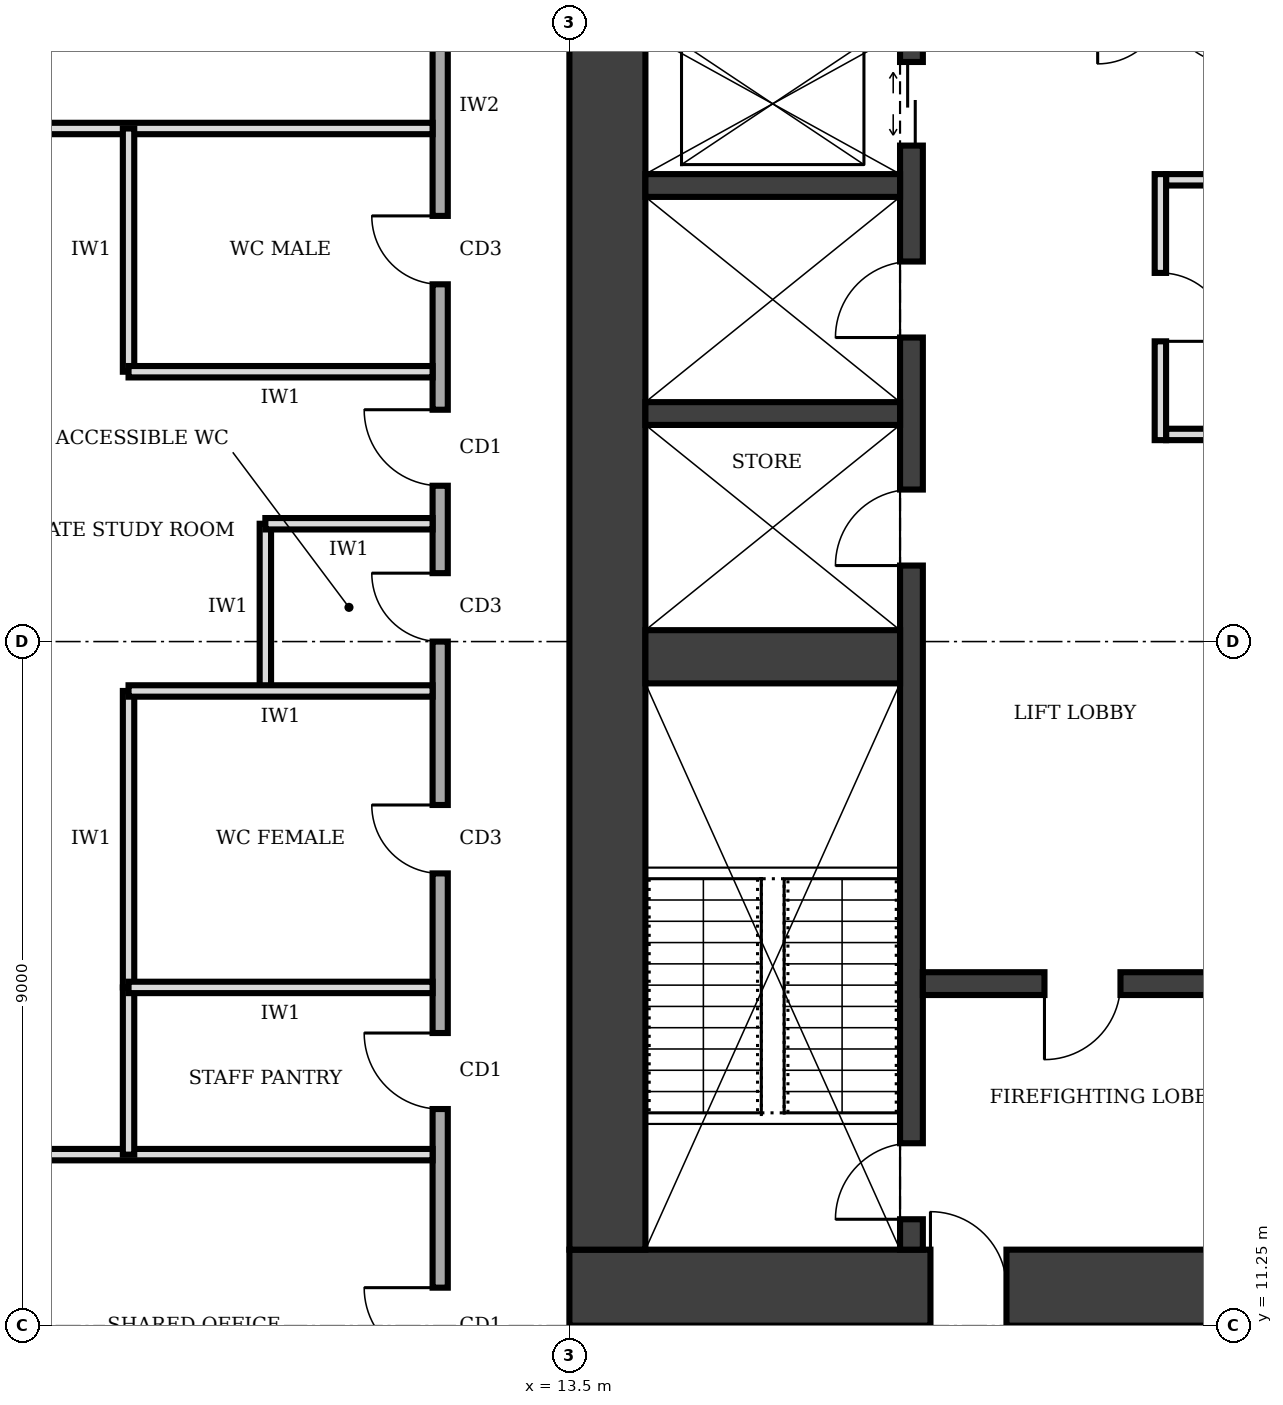
"""IFC4 building model, lengths in metres.
Left out: names, types, materials, properties, quantities, classifications, styles, units other than length and angle.
Written with IfcOpenShell. Run it as: python <this file> out.ifc"""

import sys

from ifc_helpers import new_model, si_unit, direction, frame, frame_2d, origin, place, context, subcontext, project, spatial, rectangle, extrude, element, fill, save


model = new_model("IFC4")
c1 = context("Model", 3, precision=1e-05, world=origin(), true_north=direction((0.0, 1.0)))
c2 = subcontext(c1, "Body", "Model", "MODEL_VIEW")
j1 = project(units=[si_unit("LENGTHUNIT", "METRE"), si_unit("PLANEANGLEUNIT", "RADIAN")], contexts=[c1])
p1 = place(None, origin())
s1 = spatial("IfcSite", under=j1, at=p1, CompositionType="ELEMENT")
p2 = place(p1, origin())
s2 = spatial("IfcBuilding", under=s1, at=p2, CompositionType="ELEMENT")
p3 = place(p2, frame((0.0, 0.0, 261.0)))
s3 = spatial("IfcBuildingStorey", under=s2, at=p3, CompositionType="ELEMENT", Elevation=261.0)
p4 = place(p3, frame((13.5, 11.75, 0.0), z_axis=(0.0, 0.0, 1.0), x_axis=(1.0, 0.0, 0.0)))
e1 = element("IfcWall", 1, at=p4, inside=s3, PredefinedType="SHEAR", context=c2, shape_type="SweptSolid", body=[
    extrude(rectangle(XDim=13.5, YDim=1.0, at=frame_2d((6.75, 0.0))), origin(), (0.0, 0.0, 1.0), 4.0),
])
p5 = place(p4, frame((4.75, 0.0, 0.0)))
e2 = element("IfcOpeningElement", 2, at=p5, cuts=e1, PredefinedType="OPENING", context=c2, shape_type="SweptSolid", body=[
    extrude(rectangle(XDim=1.0, YDim=2.1, at=frame_2d((0.5, 1.05))), frame((0.0, 0.51, 0.0), z_axis=(0.0, -1.0, 0.0), x_axis=(1.0, 0.0, 0.0)), (0.0, 0.0, 1.0), 1.02),
])
p6 = place(p3, frame((14.0, 28.25, 0.0), z_axis=(0.0, 0.0, 1.0), x_axis=(0.0, -1.0, 0.0)))
e3 = element("IfcWall", 3, at=p6, inside=s3, PredefinedType="SHEAR", context=c2, shape_type="SweptSolid", body=[
    extrude(rectangle(XDim=16.0, YDim=1.0, at=frame_2d((8.0, 0.0))), origin(), (0.0, 0.0, 1.0), 4.0),
])
p7 = place(p3, frame((18.0, 12.25, 0.0), z_axis=(0.0, 0.0, 1.0), x_axis=(0.0, 1.0, 0.0)))
e4 = element("IfcWall", 4, at=p7, inside=s3, PredefinedType="SHEAR", context=c2, shape_type="SweptSolid", body=[
    extrude(rectangle(XDim=16.0, YDim=0.3, at=frame_2d((8.0, 0.0))), origin(), (0.0, 0.0, 1.0), 4.0),
])
p8 = place(p7, frame((0.4, 0.0, 0.0)))
e5 = element("IfcOpeningElement", 5, at=p8, cuts=e4, PredefinedType="OPENING", context=c2, shape_type="SweptSolid", body=[
    extrude(rectangle(XDim=1.0, YDim=2.1, at=frame_2d((0.5, 1.05))), frame((0.0, 0.16, 0.0), z_axis=(0.0, -1.0, 0.0), x_axis=(1.0, 0.0, 0.0)), (0.0, 0.0, 1.0), 0.32),
])
p9 = place(p7, frame((14.525, 0.0, 0.0)))
e6 = element("IfcOpeningElement", 6, at=p9, cuts=e4, PredefinedType="OPENING", context=c2, shape_type="SweptSolid", body=[
    extrude(rectangle(XDim=1.1, YDim=2.1, at=frame_2d((0.55, 1.05))), frame((0.0, 0.16, 0.0), z_axis=(0.0, -1.0, 0.0), x_axis=(1.0, 0.0, 0.0)), (0.0, 0.0, 1.0), 0.32),
])
p10 = place(p7, frame((9.0, 0.0, 0.0)))
e7 = element("IfcOpeningElement", 7, at=p10, cuts=e4, PredefinedType="OPENING", context=c2, shape_type="SweptSolid", body=[
    extrude(rectangle(XDim=1.0, YDim=2.1, at=frame_2d((0.5, 1.05))), frame((0.0, 0.16, 0.0), z_axis=(0.0, -1.0, 0.0), x_axis=(1.0, 0.0, 0.0)), (0.0, 0.0, 1.0), 0.32),
])
p11 = place(p7, frame((12.0, 0.0, 0.0)))
e8 = element("IfcOpeningElement", 8, at=p11, cuts=e4, PredefinedType="OPENING", context=c2, shape_type="SweptSolid", body=[
    extrude(rectangle(XDim=1.0, YDim=2.1, at=frame_2d((0.5, 1.05))), frame((0.0, 0.16, 0.0), z_axis=(0.0, -1.0, 0.0), x_axis=(1.0, 0.0, 0.0)), (0.0, 0.0, 1.0), 0.32),
])
p12 = place(p3, frame((14.5, 20.05, 0.0), z_axis=(0.0, 0.0, 1.0), x_axis=(1.0, 0.0, 0.0)))
e9 = element("IfcWall", 9, at=p12, inside=s3, PredefinedType="SHEAR", context=c2, shape_type="SweptSolid", body=[
    extrude(rectangle(XDim=3.35, YDim=0.7, at=frame_2d((1.675, 0.0))), origin(), (0.0, 0.0, 1.0), 4.0),
])
p13 = place(p3, frame((18.15, 15.75, 0.0), z_axis=(0.0, 0.0, 1.0), x_axis=(1.0, 0.0, 0.0)))
e10 = element("IfcWall", 10, at=p13, inside=s3, PredefinedType="SHEAR", context=c2, shape_type="SweptSolid", body=[
    extrude(rectangle(XDim=4.2, YDim=0.3, at=frame_2d((2.1, 0.0))), origin(), (0.0, 0.0, 1.0), 4.0),
])
p14 = place(p13, frame((1.6, 0.0, 0.0)))
e11 = element("IfcOpeningElement", 11, at=p14, cuts=e10, PredefinedType="OPENING", context=c2, shape_type="SweptSolid", body=[
    extrude(rectangle(XDim=1.0, YDim=2.1, at=frame_2d((0.5, 1.05))), frame((0.0, 0.16, 0.0), z_axis=(0.0, -1.0, 0.0), x_axis=(1.0, 0.0, 0.0)), (0.0, 0.0, 1.0), 0.32),
])
for number, where, z_axis, x_axis in (
    (12, (14.5, 23.25, 0.0), (0.0, 0.0, 1.0), (1.0, 0.0, 0.0)),
    (13, (14.5, 26.25, 0.0), (0.0, 0.0, 1.0), (1.0, 0.0, 0.0)),
):
    element("IfcWall", number, at=place(p3, frame(where, z_axis=z_axis, x_axis=x_axis)), inside=s3, PredefinedType="SHEAR", context=c2, shape_type="SweptSolid", body=[
        extrude(rectangle(XDim=3.35, YDim=0.3, at=frame_2d((1.675, 0.0))), origin(), (0.0, 0.0, 1.0), 4.0),
    ])
p15 = place(p3, frame((21.275, 22.9, 0.0), z_axis=(0.0, 0.0, 1.0), x_axis=(0.0, 1.0, 0.0)))
e14 = element("IfcWall", 14, at=p15, inside=s3, PredefinedType="PARTITIONING", context=c2, shape_type="SweptSolid", body=[
    extrude(rectangle(XDim=3.5, YDim=0.15, at=frame_2d((1.75, 0.0))), origin(), (0.0, 0.0, 1.0), 3.75),
])
p16 = place(p15, frame((1.3, 0.0, 0.0)))
e15 = element("IfcOpeningElement", 15, at=p16, cuts=e14, PredefinedType="OPENING", context=c2, shape_type="SweptSolid", body=[
    extrude(rectangle(XDim=0.9, YDim=2.1, at=frame_2d((0.45, 1.05))), frame((0.0, 0.085, 0.0), z_axis=(0.0, -1.0, 0.0), x_axis=(1.0, 0.0, 0.0)), (0.0, 0.0, 1.0), 0.17),
])
for number, where, z_axis, x_axis in (
    (16, (21.35, 22.975, 0.0), (0.0, 0.0, 1.0), (1.0, 0.0, 0.0)),
    (17, (21.35, 26.325, 0.0), (0.0, 0.0, 1.0), (1.0, 0.0, 0.0)),
):
    element("IfcWall", number, at=place(p3, frame(where, z_axis=z_axis, x_axis=x_axis)), inside=s3, PredefinedType="PARTITIONING", context=c2, shape_type="SweptSolid", body=[
        extrude(rectangle(XDim=1.0, YDim=0.15, at=frame_2d((0.5, 0.0))), origin(), (0.0, 0.0, 1.0), 3.75),
    ])
p17 = place(p3, frame((11.8, 31.3, 0.0), z_axis=(0.0, 0.0, 1.0), x_axis=(0.0, -1.0, 0.0)))
e18 = element("IfcWall", 18, at=p17, inside=s3, PredefinedType="SOLIDWALL", context=c2, shape_type="SweptSolid", body=[
    extrude(rectangle(XDim=22.3, YDim=0.2, at=frame_2d((11.15, 0.0))), origin(), (0.0, 0.0, 1.0), 3.75),
])
p18 = place(p17, frame((19.55, 0.0, 0.0)))
e19 = element("IfcOpeningElement", 19, at=p18, cuts=e18, PredefinedType="OPENING", context=c2, shape_type="SweptSolid", body=[
    extrude(rectangle(XDim=1.0, YDim=2.1, at=frame_2d((0.5, 1.05))), frame((0.0, 0.11, 0.0), z_axis=(0.0, -1.0, 0.0), x_axis=(1.0, 0.0, 0.0)), (0.0, 0.0, 1.0), 0.22),
])
p19 = place(p17, frame((16.2, 0.0, 0.0)))
e20 = element("IfcOpeningElement", 20, at=p19, cuts=e18, PredefinedType="OPENING", context=c2, shape_type="SweptSolid", body=[
    extrude(rectangle(XDim=1.0, YDim=2.1, at=frame_2d((0.5, 1.05))), frame((0.0, 0.11, 0.0), z_axis=(0.0, -1.0, 0.0), x_axis=(1.0, 0.0, 0.0)), (0.0, 0.0, 1.0), 0.22),
])
p20 = place(p17, frame((13.2, 0.0, 0.0)))
e21 = element("IfcOpeningElement", 21, at=p20, cuts=e18, PredefinedType="OPENING", context=c2, shape_type="SweptSolid", body=[
    extrude(rectangle(XDim=0.9, YDim=2.1, at=frame_2d((0.45, 1.05))), frame((0.0, 0.11, 0.0), z_axis=(0.0, -1.0, 0.0), x_axis=(1.0, 0.0, 0.0)), (0.0, 0.0, 1.0), 0.22),
])
p21 = place(p17, frame((10.15, 0.0, 0.0)))
e22 = element("IfcOpeningElement", 22, at=p21, cuts=e18, PredefinedType="OPENING", context=c2, shape_type="SweptSolid", body=[
    extrude(rectangle(XDim=0.9, YDim=2.1, at=frame_2d((0.45, 1.05))), frame((0.0, 0.11, 0.0), z_axis=(0.0, -1.0, 0.0), x_axis=(1.0, 0.0, 0.0)), (0.0, 0.0, 1.0), 0.22),
])
p22 = place(p17, frame((5.45, 0.0, 0.0)))
e23 = element("IfcOpeningElement", 23, at=p22, cuts=e18, PredefinedType="OPENING", context=c2, shape_type="SweptSolid", body=[
    extrude(rectangle(XDim=0.9, YDim=2.1, at=frame_2d((0.45, 1.05))), frame((0.0, 0.11, 0.0), z_axis=(0.0, -1.0, 0.0), x_axis=(1.0, 0.0, 0.0)), (0.0, 0.0, 1.0), 0.22),
])
p23 = place(p17, frame((8.0, 0.0, 0.0)))
e24 = element("IfcOpeningElement", 24, at=p23, cuts=e18, PredefinedType="OPENING", context=c2, shape_type="SweptSolid", body=[
    extrude(rectangle(XDim=1.0, YDim=2.1, at=frame_2d((0.5, 1.05))), frame((0.0, 0.11, 0.0), z_axis=(0.0, -1.0, 0.0), x_axis=(1.0, 0.0, 0.0)), (0.0, 0.0, 1.0), 0.22),
])
p24 = place(p17, frame((1.55, 0.0, 0.0)))
e25 = element("IfcOpeningElement", 25, at=p24, cuts=e18, PredefinedType="OPENING", context=c2, shape_type="SweptSolid", body=[
    extrude(rectangle(XDim=1.0, YDim=2.1, at=frame_2d((0.5, 1.05))), frame((0.0, 0.11, 0.0), z_axis=(0.0, -1.0, 0.0), x_axis=(1.0, 0.0, 0.0)), (0.0, 0.0, 1.0), 0.22),
])
for number, where, z_axis, x_axis in (
    (26, (0.3, 13.5, 0.0), (0.0, 0.0, 1.0), (1.0, 0.0, 0.0)),
    (27, (0.3, 27.0, 0.0), (0.0, 0.0, 1.0), (1.0, 0.0, 0.0)),
):
    element("IfcWall", number, at=place(p3, frame(where, z_axis=z_axis, x_axis=x_axis)), inside=s3, PredefinedType="PARTITIONING", context=c2, shape_type="SweptSolid", body=[
        extrude(rectangle(XDim=11.4, YDim=0.15, at=frame_2d((5.7, 0.0))), origin(), (0.0, 0.0, 1.0), 3.75),
    ])
p25 = place(p3, frame((11.7, 15.7, 0.0), z_axis=(0.0, 0.0, 1.0), x_axis=(-1.0, 0.0, 0.0)))
e28 = element("IfcWall", 28, at=p25, inside=s3, PredefinedType="PARTITIONING", context=c2, shape_type="SweptSolid", body=[
    extrude(rectangle(XDim=4.0, YDim=0.15, at=frame_2d((2.0, 0.0))), origin(), (0.0, 0.0, 1.0), 3.75),
])
p26 = place(p3, frame((11.7, 19.6, 0.0), z_axis=(0.0, 0.0, 1.0), x_axis=(-1.0, 0.0, 0.0)))
e29 = element("IfcWall", 29, at=p26, inside=s3, PredefinedType="PARTITIONING", context=c2, shape_type="SweptSolid", body=[
    extrude(rectangle(XDim=4.0, YDim=0.15, at=frame_2d((2.0, 0.0))), origin(), (0.0, 0.0, 1.0), 2.85),
])
p27 = place(p3, frame((11.7, 21.8, 0.0), z_axis=(0.0, 0.0, 1.0), x_axis=(-1.0, 0.0, 0.0)))
e30 = element("IfcWall", 30, at=p27, inside=s3, PredefinedType="PARTITIONING", context=c2, shape_type="SweptSolid", body=[
    extrude(rectangle(XDim=2.2, YDim=0.15, at=frame_2d((1.1, 0.0))), origin(), (0.0, 0.0, 1.0), 3.75),
])
p28 = place(p3, frame((11.7, 23.8, 0.0), z_axis=(0.0, 0.0, 1.0), x_axis=(-1.0, 0.0, 0.0)))
e31 = element("IfcWall", 31, at=p28, inside=s3, PredefinedType="PARTITIONING", context=c2, shape_type="SweptSolid", body=[
    extrude(rectangle(XDim=4.0, YDim=0.15, at=frame_2d((2.0, 0.0))), origin(), (0.0, 0.0, 1.0), 3.75),
])
p29 = place(p3, frame((7.7, 13.5, 0.0), z_axis=(0.0, 0.0, 1.0), x_axis=(0.0, 1.0, 0.0)))
e32 = element("IfcWall", 32, at=p29, inside=s3, PredefinedType="PARTITIONING", context=c2, shape_type="SweptSolid", body=[
    extrude(rectangle(XDim=2.2, YDim=0.15, at=frame_2d((1.1, 0.0))), origin(), (0.0, 0.0, 1.0), 3.75),
])
p30 = place(p3, frame((7.7, 15.7, 0.0), z_axis=(0.0, 0.0, 1.0), x_axis=(0.0, 1.0, 0.0)))
e33 = element("IfcWall", 33, at=p30, inside=s3, PredefinedType="PARTITIONING", context=c2, shape_type="SweptSolid", body=[
    extrude(rectangle(XDim=3.9, YDim=0.15, at=frame_2d((1.95, 0.0))), origin(), (0.0, 0.0, 1.0), 3.75),
])
p31 = place(p3, frame((9.5, 19.6, 0.0), z_axis=(0.0, 0.0, 1.0), x_axis=(0.0, 1.0, 0.0)))
e34 = element("IfcWall", 34, at=p31, inside=s3, PredefinedType="PARTITIONING", context=c2, shape_type="SweptSolid", body=[
    extrude(rectangle(XDim=2.2, YDim=0.15, at=frame_2d((1.1, 0.0))), origin(), (0.0, 0.0, 1.0), 3.75),
])
p32 = place(p3, frame((7.7, 23.8, 0.0), z_axis=(0.0, 0.0, 1.0), x_axis=(0.0, 1.0, 0.0)))
e35 = element("IfcWall", 35, at=p32, inside=s3, PredefinedType="PARTITIONING", context=c2, shape_type="SweptSolid", body=[
    extrude(rectangle(XDim=3.2, YDim=0.15, at=frame_2d((1.6, 0.0))), origin(), (0.0, 0.0, 1.0), 3.75),
])
p33 = place(p5, origin())
e36 = element("IfcDoor", 36, at=p33, inside=s3, OperationType="SINGLE_SWING_LEFT", PredefinedType="DOOR", context=c2, shape_type="SweptSolid", body=[
    extrude(rectangle(XDim=1.0, YDim=2.1, at=frame_2d((0.5, 1.05))), frame((0.0, 0.025, 0.0), z_axis=(0.0, -1.0, 0.0), x_axis=(1.0, 0.0, 0.0)), (0.0, 0.0, 1.0), 0.05),
])
fill(e2, e36)
p34 = place(p14, frame((1.0, 0.0, 0.0), z_axis=(0.0, 0.0, 1.0), x_axis=(-1.0, 0.0, 0.0)))
e37 = element("IfcDoor", 37, at=p34, inside=s3, OperationType="SINGLE_SWING_RIGHT", PredefinedType="DOOR", context=c2, shape_type="SweptSolid", body=[
    extrude(rectangle(XDim=1.0, YDim=2.1, at=frame_2d((0.5, 1.05))), frame((0.0, 0.025, 0.0), z_axis=(0.0, -1.0, 0.0), x_axis=(1.0, 0.0, 0.0)), (0.0, 0.0, 1.0), 0.05),
])
fill(e11, e37)
p35 = place(p8, origin())
e38 = element("IfcDoor", 38, at=p35, inside=s3, OperationType="SINGLE_SWING_LEFT", PredefinedType="DOOR", context=c2, shape_type="SweptSolid", body=[
    extrude(rectangle(XDim=1.0, YDim=2.1, at=frame_2d((0.5, 1.05))), frame((0.0, 0.025, 0.0), z_axis=(0.0, -1.0, 0.0), x_axis=(1.0, 0.0, 0.0)), (0.0, 0.0, 1.0), 0.05),
])
fill(e5, e38)
p36 = place(p9, origin())
e39 = element("IfcDoor", 39, at=p36, inside=s3, OperationType="DOUBLE_DOOR_SLIDING", PredefinedType="DOOR", context=c2, shape_type="SweptSolid", body=[
    extrude(rectangle(XDim=1.1, YDim=2.1, at=frame_2d((0.55, 1.05))), frame((0.0, 0.025, 0.0), z_axis=(0.0, -1.0, 0.0), x_axis=(1.0, 0.0, 0.0)), (0.0, 0.0, 1.0), 0.05),
])
fill(e6, e39)
p37 = place(p16, frame((0.9, 0.0, 0.0), z_axis=(0.0, 0.0, 1.0), x_axis=(-1.0, 0.0, 0.0)))
e40 = element("IfcDoor", 40, at=p37, inside=s3, OperationType="SINGLE_SWING_RIGHT", PredefinedType="DOOR", context=c2, shape_type="SweptSolid", body=[
    extrude(rectangle(XDim=0.9, YDim=2.1, at=frame_2d((0.45, 1.05))), frame((0.0, 0.025, 0.0), z_axis=(0.0, -1.0, 0.0), x_axis=(1.0, 0.0, 0.0)), (0.0, 0.0, 1.0), 0.05),
])
fill(e15, e40)
p38 = place(p10, origin())
e41 = element("IfcDoor", 41, at=p38, inside=s3, OperationType="SINGLE_SWING_LEFT", PredefinedType="DOOR", context=c2, shape_type="SweptSolid", body=[
    extrude(rectangle(XDim=1.0, YDim=2.1, at=frame_2d((0.5, 1.05))), frame((0.0, 0.025, 0.0), z_axis=(0.0, -1.0, 0.0), x_axis=(1.0, 0.0, 0.0)), (0.0, 0.0, 1.0), 0.05),
])
fill(e7, e41)
p39 = place(p11, origin())
e42 = element("IfcDoor", 42, at=p39, inside=s3, OperationType="SINGLE_SWING_LEFT", PredefinedType="DOOR", context=c2, shape_type="SweptSolid", body=[
    extrude(rectangle(XDim=1.0, YDim=2.1, at=frame_2d((0.5, 1.05))), frame((0.0, 0.025, 0.0), z_axis=(0.0, -1.0, 0.0), x_axis=(1.0, 0.0, 0.0)), (0.0, 0.0, 1.0), 0.05),
])
fill(e8, e42)
p40 = place(p18, frame((1.0, 0.0, 0.0), z_axis=(0.0, 0.0, 1.0), x_axis=(-1.0, 0.0, 0.0)))
e43 = element("IfcDoor", 43, at=p40, inside=s3, OperationType="SINGLE_SWING_RIGHT", PredefinedType="DOOR", context=c2, shape_type="SweptSolid", body=[
    extrude(rectangle(XDim=1.0, YDim=2.1, at=frame_2d((0.5, 1.05))), frame((0.0, 0.025, 0.0), z_axis=(0.0, -1.0, 0.0), x_axis=(1.0, 0.0, 0.0)), (0.0, 0.0, 1.0), 0.05),
])
fill(e19, e43)
p41 = place(p19, frame((1.0, 0.0, 0.0), z_axis=(0.0, 0.0, 1.0), x_axis=(-1.0, 0.0, 0.0)))
e44 = element("IfcDoor", 44, at=p41, inside=s3, OperationType="SINGLE_SWING_RIGHT", PredefinedType="DOOR", context=c2, shape_type="SweptSolid", body=[
    extrude(rectangle(XDim=1.0, YDim=2.1, at=frame_2d((0.5, 1.05))), frame((0.0, 0.025, 0.0), z_axis=(0.0, -1.0, 0.0), x_axis=(1.0, 0.0, 0.0)), (0.0, 0.0, 1.0), 0.05),
])
fill(e20, e44)
p42 = place(p20, frame((0.9, 0.0, 0.0), z_axis=(0.0, 0.0, 1.0), x_axis=(-1.0, 0.0, 0.0)))
e45 = element("IfcDoor", 45, at=p42, inside=s3, OperationType="SINGLE_SWING_RIGHT", PredefinedType="DOOR", context=c2, shape_type="SweptSolid", body=[
    extrude(rectangle(XDim=0.9, YDim=2.1, at=frame_2d((0.45, 1.05))), frame((0.0, 0.025, 0.0), z_axis=(0.0, -1.0, 0.0), x_axis=(1.0, 0.0, 0.0)), (0.0, 0.0, 1.0), 0.05),
])
fill(e21, e45)
p43 = place(p21, frame((0.9, 0.0, 0.0), z_axis=(0.0, 0.0, 1.0), x_axis=(-1.0, 0.0, 0.0)))
e46 = element("IfcDoor", 46, at=p43, inside=s3, OperationType="SINGLE_SWING_RIGHT", PredefinedType="DOOR", context=c2, shape_type="SweptSolid", body=[
    extrude(rectangle(XDim=0.9, YDim=2.1, at=frame_2d((0.45, 1.05))), frame((0.0, 0.025, 0.0), z_axis=(0.0, -1.0, 0.0), x_axis=(1.0, 0.0, 0.0)), (0.0, 0.0, 1.0), 0.05),
])
fill(e22, e46)
p44 = place(p22, frame((0.9, 0.0, 0.0), z_axis=(0.0, 0.0, 1.0), x_axis=(-1.0, 0.0, 0.0)))
e47 = element("IfcDoor", 47, at=p44, inside=s3, OperationType="SINGLE_SWING_RIGHT", PredefinedType="DOOR", context=c2, shape_type="SweptSolid", body=[
    extrude(rectangle(XDim=0.9, YDim=2.1, at=frame_2d((0.45, 1.05))), frame((0.0, 0.025, 0.0), z_axis=(0.0, -1.0, 0.0), x_axis=(1.0, 0.0, 0.0)), (0.0, 0.0, 1.0), 0.05),
])
fill(e23, e47)
p45 = place(p23, frame((1.0, 0.0, 0.0), z_axis=(0.0, 0.0, 1.0), x_axis=(-1.0, 0.0, 0.0)))
e48 = element("IfcDoor", 48, at=p45, inside=s3, OperationType="SINGLE_SWING_RIGHT", PredefinedType="DOOR", context=c2, shape_type="SweptSolid", body=[
    extrude(rectangle(XDim=1.0, YDim=2.1, at=frame_2d((0.5, 1.05))), frame((0.0, 0.025, 0.0), z_axis=(0.0, -1.0, 0.0), x_axis=(1.0, 0.0, 0.0)), (0.0, 0.0, 1.0), 0.05),
])
fill(e24, e48)
save(model, sys.argv[1])
